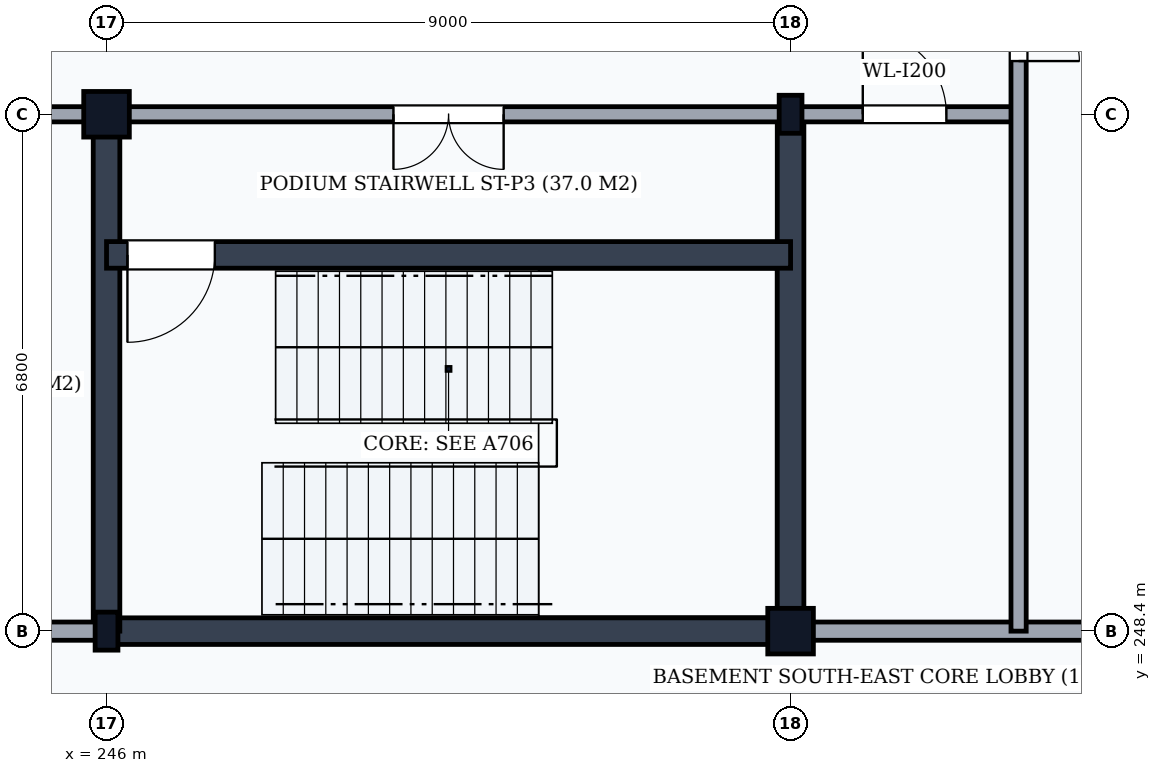
"""IFC4 building model, lengths in metres.
Left out: names, types, materials, properties, quantities, classifications, styles, units other than length and angle.
Written with IfcOpenShell. Run it as: python <this file> out.ifc"""

import sys

from ifc_helpers import new_model, si_unit, direction, frame, frame_2d, origin, origin_2d, place, context, subcontext, project, spatial, rectangle, i_section, extrude, element, fill, save


model = new_model("IFC4")
c1 = context("Model", 3, precision=1e-05, world=origin(), true_north=direction((0.0, 1.0)))
c2 = subcontext(c1, "Body", "Model", "MODEL_VIEW")
j1 = project(units=[si_unit("LENGTHUNIT", "METRE"), si_unit("PLANEANGLEUNIT", "RADIAN")], contexts=[c1])
p1 = place(None, origin())
s1 = spatial("IfcSite", under=j1, at=p1, CompositionType="ELEMENT")
p2 = place(p1, origin())
s2 = spatial("IfcBuilding", under=s1, at=p2, CompositionType="ELEMENT")
p3 = place(p2, frame((0.0, 0.0, -4.8)))
s3 = spatial("IfcBuildingStorey", under=s2, at=p3, CompositionType="ELEMENT", Elevation=-4.8)
p4 = place(p3, frame((246.0, 248.4, 0.0), z_axis=(0.0, 0.0, 1.0), x_axis=(1.0, 0.0, 0.0)))
e1 = element("IfcColumn", 1, at=p4, inside=s3, PredefinedType="COLUMN", context=c2, shape_type="SweptSolid", body=[
    extrude(i_section(OverallWidth=0.3, OverallDepth=0.5, WebThickness=0.014, FlangeThickness=0.028, FilletRadius=0.027, at=origin_2d()), origin(), (0.0, 0.0, 1.0), 4.8),
])
for number, where, z_axis, x_axis in (
    (2, (246.0, 255.2, 0.0), (0.0, 0.0, 1.0), (1.0, 0.0, 0.0)),
    (3, (255.0, 248.4, 0.0), (0.0, 0.0, 1.0), (1.0, 0.0, 0.0)),
):
    element("IfcColumn", number, at=place(p3, frame(where, z_axis=z_axis, x_axis=x_axis)), inside=s3, PredefinedType="COLUMN", context=c2, shape_type="SweptSolid", body=[
        extrude(rectangle(XDim=0.6, YDim=0.6, at=origin_2d()), origin(), (0.0, 0.0, 1.0), 4.8),
    ])
p5 = place(p3, frame((255.0, 255.2, 0.0), z_axis=(0.0, 0.0, 1.0), x_axis=(1.0, 0.0, 0.0)))
e4 = element("IfcColumn", 4, at=p5, inside=s3, PredefinedType="COLUMN", context=c2, shape_type="SweptSolid", body=[
    extrude(i_section(OverallWidth=0.3, OverallDepth=0.5, WebThickness=0.014, FlangeThickness=0.028, FilletRadius=0.027, at=origin_2d()), origin(), (0.0, 0.0, 1.0), 4.8),
])
p6 = place(p3, frame((246.0, 248.4, 0.0), z_axis=(0.0, 0.0, 1.0), x_axis=(1.0, 0.0, 0.0)))
e5 = element("IfcWall", 5, at=p6, inside=s3, PredefinedType="SHEAR", context=c2, shape_type="SweptSolid", body=[
    extrude(rectangle(XDim=9.0, YDim=0.35, at=frame_2d((4.5, 0.0))), origin(), (0.0, 0.0, 1.0), 4.51),
])
for number, where, z_axis, x_axis in (
    (6, (246.0, 248.4, 0.0), (0.0, 0.0, 1.0), (0.0, 1.0, 0.0)),
    (7, (255.0, 248.4, 0.0), (0.0, 0.0, 1.0), (0.0, 1.0, 0.0)),
):
    element("IfcWall", number, at=place(p3, frame(where, z_axis=z_axis, x_axis=x_axis)), inside=s3, PredefinedType="SHEAR", context=c2, shape_type="SweptSolid", body=[
        extrude(rectangle(XDim=6.8, YDim=0.35, at=frame_2d((3.4, 0.0))), origin(), (0.0, 0.0, 1.0), 4.51),
    ])
p7 = place(p3, frame((246.0, 253.35, 0.0), z_axis=(0.0, 0.0, 1.0), x_axis=(1.0, 0.0, 0.0)))
e8 = element("IfcWall", 8, at=p7, inside=s3, PredefinedType="SHEAR", context=c2, shape_type="SweptSolid", body=[
    extrude(rectangle(XDim=9.0, YDim=0.35, at=frame_2d((4.5, 0.0))), origin(), (0.0, 0.0, 1.0), 4.51),
])
p8 = place(p7, frame((0.275, 0.0, 0.0)))
e9 = element("IfcOpeningElement", 9, at=p8, cuts=e8, PredefinedType="OPENING", context=c2, shape_type="SweptSolid", body=[
    extrude(rectangle(XDim=1.15, YDim=2.15, at=frame_2d((0.575, 1.075))), frame((0.0, 0.19, 0.0), z_axis=(0.0, -1.0, 0.0), x_axis=(1.0, 0.0, 0.0)), (0.0, 0.0, 1.0), 0.38),
])
p9 = place(p3, frame((246.0, 255.2, 0.0), z_axis=(0.0, 0.0, 1.0), x_axis=(1.0, 0.0, 0.0)))
e10 = element("IfcWall", 10, at=p9, inside=s3, PredefinedType="PARTITIONING", context=c2, shape_type="SweptSolid", body=[
    extrude(rectangle(XDim=9.0, YDim=0.2, at=frame_2d((4.5, 0.0))), origin(), (0.0, 0.0, 1.0), 3.808),
])
p10 = place(p9, frame((3.775, 0.0, 0.0)))
e11 = element("IfcOpeningElement", 11, at=p10, cuts=e10, PredefinedType="OPENING", context=c2, shape_type="SweptSolid", body=[
    extrude(rectangle(XDim=1.45, YDim=2.2, at=frame_2d((0.725, 1.1))), frame((0.0, 0.115, 0.0), z_axis=(0.0, -1.0, 0.0), x_axis=(1.0, 0.0, 0.0)), (0.0, 0.0, 1.0), 0.23),
])
p11 = place(p3, frame((255.0, 255.2, 0.0), z_axis=(0.0, 0.0, 1.0), x_axis=(1.0, 0.0, 0.0)))
e12 = element("IfcWall", 12, at=p11, inside=s3, PredefinedType="PARTITIONING", context=c2, shape_type="SweptSolid", body=[
    extrude(rectangle(XDim=3.0, YDim=0.2, at=frame_2d((1.5, 0.0))), origin(), (0.0, 0.0, 1.0), 3.808),
])
p12 = place(p11, frame((0.95, 0.0, 0.0)))
e13 = element("IfcOpeningElement", 13, at=p12, cuts=e12, PredefinedType="OPENING", context=c2, shape_type="SweptSolid", body=[
    extrude(rectangle(XDim=1.1, YDim=2.1, at=frame_2d((0.55, 1.05))), frame((0.0, 0.115, 0.0), z_axis=(0.0, -1.0, 0.0), x_axis=(1.0, 0.0, 0.0)), (0.0, 0.0, 1.0), 0.23),
])
p13 = place(p3, frame((237.0, 248.4, 0.0), z_axis=(0.0, 0.0, 1.0), x_axis=(1.0, 0.0, 0.0)))
e14 = element("IfcWall", 14, at=p13, inside=s3, PredefinedType="PARTITIONING", context=c2, shape_type="SweptSolid", body=[
    extrude(rectangle(XDim=9.0, YDim=0.24, at=frame_2d((4.5, 0.0))), origin(), (0.0, 0.0, 1.0), 3.808),
])
p14 = place(p13, frame((3.2, 0.0, 0.0)))
e15 = element("IfcOpeningElement", 15, at=p14, cuts=e14, PredefinedType="OPENING", context=c2, shape_type="SweptSolid", body=[
    extrude(rectangle(XDim=1.6, YDim=2.1, at=frame_2d((0.8, 1.05))), frame((0.0, 0.135, 0.0), z_axis=(0.0, -1.0, 0.0), x_axis=(1.0, 0.0, 0.0)), (0.0, 0.0, 1.0), 0.27),
])
p15 = place(p3, frame((255.0, 248.4, 0.0), z_axis=(0.0, 0.0, 1.0), x_axis=(1.0, 0.0, 0.0)))
e16 = element("IfcWall", 16, at=p15, inside=s3, PredefinedType="PARTITIONING", context=c2, shape_type="SweptSolid", body=[
    extrude(rectangle(XDim=33.0, YDim=0.24, at=frame_2d((16.5, 0.0))), origin(), (0.0, 0.0, 1.0), 3.808),
])
p16 = place(p15, frame((11.2, 0.0, 0.0)))
e17 = element("IfcOpeningElement", 17, at=p16, cuts=e16, PredefinedType="OPENING", context=c2, shape_type="SweptSolid", body=[
    extrude(rectangle(XDim=1.6, YDim=2.1, at=frame_2d((0.8, 1.05))), frame((0.0, 0.135, 0.0), z_axis=(0.0, -1.0, 0.0), x_axis=(1.0, 0.0, 0.0)), (0.0, 0.0, 1.0), 0.27),
])
p17 = place(p3, frame((237.0, 255.2, 0.0), z_axis=(0.0, 0.0, 1.0), x_axis=(1.0, 0.0, 0.0)))
e18 = element("IfcWall", 18, at=p17, inside=s3, PredefinedType="PARTITIONING", context=c2, shape_type="SweptSolid", body=[
    extrude(rectangle(XDim=9.0, YDim=0.2, at=frame_2d((4.5, 0.0))), origin(), (0.0, 0.0, 1.0), 3.808),
])
p18 = place(p17, frame((3.95, 0.0, 0.0)))
e19 = element("IfcOpeningElement", 19, at=p18, cuts=e18, PredefinedType="OPENING", context=c2, shape_type="SweptSolid", body=[
    extrude(rectangle(XDim=1.1, YDim=2.1, at=frame_2d((0.55, 1.05))), frame((0.0, 0.115, 0.0), z_axis=(0.0, -1.0, 0.0), x_axis=(1.0, 0.0, 0.0)), (0.0, 0.0, 1.0), 0.23),
])
p19 = place(p3, frame((258.0, 248.4, 0.0), z_axis=(0.0, 0.0, 1.0), x_axis=(0.0, 1.0, 0.0)))
e20 = element("IfcWall", 20, at=p19, inside=s3, PredefinedType="PARTITIONING", context=c2, shape_type="SweptSolid", body=[
    extrude(rectangle(XDim=9.8, YDim=0.2, at=frame_2d((4.9, 0.0))), origin(), (0.0, 0.0, 1.0), 4.51),
])
p20 = place(p19, frame((7.5, 0.0, 0.0)))
e21 = element("IfcOpeningElement", 21, at=p20, cuts=e20, PredefinedType="OPENING", context=c2, shape_type="SweptSolid", body=[
    extrude(rectangle(XDim=1.6, YDim=2.1, at=frame_2d((0.8, 1.05))), frame((0.0, 0.115, 0.0), z_axis=(0.0, -1.0, 0.0), x_axis=(1.0, 0.0, 0.0)), (0.0, 0.0, 1.0), 0.23),
])
p21 = place(p8, frame((1.15, 0.0, 0.0), z_axis=(0.0, 0.0, 1.0), x_axis=(-1.0, 0.0, 0.0)))
e22 = element("IfcDoor", 22, at=p21, inside=s3, OperationType="SINGLE_SWING_RIGHT", PredefinedType="DOOR", context=c2, shape_type="SweptSolid", body=[
    extrude(rectangle(XDim=1.15, YDim=2.15, at=frame_2d((0.575, 1.075))), frame((0.0, 0.025, 0.0), z_axis=(0.0, -1.0, 0.0), x_axis=(1.0, 0.0, 0.0)), (0.0, 0.0, 1.0), 0.05),
])
fill(e9, e22)
p22 = place(p10, frame((1.45, 0.0, 0.0), z_axis=(0.0, 0.0, 1.0), x_axis=(-1.0, 0.0, 0.0)))
e23 = element("IfcDoor", 23, at=p22, inside=s3, OperationType="DOUBLE_DOOR_SINGLE_SWING", PredefinedType="DOOR", context=c2, shape_type="SweptSolid", body=[
    extrude(rectangle(XDim=1.45, YDim=2.2, at=frame_2d((0.725, 1.1))), frame((0.0, 0.025, 0.0), z_axis=(0.0, -1.0, 0.0), x_axis=(1.0, 0.0, 0.0)), (0.0, 0.0, 1.0), 0.05),
])
fill(e11, e23)
p23 = place(p12, origin())
e24 = element("IfcDoor", 24, at=p23, inside=s3, OperationType="SINGLE_SWING_LEFT", PredefinedType="DOOR", context=c2, shape_type="SweptSolid", body=[
    extrude(rectangle(XDim=1.1, YDim=2.1, at=frame_2d((0.55, 1.05))), frame((0.0, 0.025, 0.0), z_axis=(0.0, -1.0, 0.0), x_axis=(1.0, 0.0, 0.0)), (0.0, 0.0, 1.0), 0.05),
])
fill(e13, e24)
p24 = place(p20, frame((1.6, 0.0, 0.0), z_axis=(0.0, 0.0, 1.0), x_axis=(-1.0, 0.0, 0.0)))
e25 = element("IfcDoor", 25, at=p24, inside=s3, OperationType="DOUBLE_DOOR_SINGLE_SWING", PredefinedType="DOOR", context=c2, shape_type="SweptSolid", body=[
    extrude(rectangle(XDim=1.6, YDim=2.1, at=frame_2d((0.8, 1.05))), frame((0.0, 0.025, 0.0), z_axis=(0.0, -1.0, 0.0), x_axis=(1.0, 0.0, 0.0)), (0.0, 0.0, 1.0), 0.05),
])
fill(e21, e25)
save(model, sys.argv[1])
